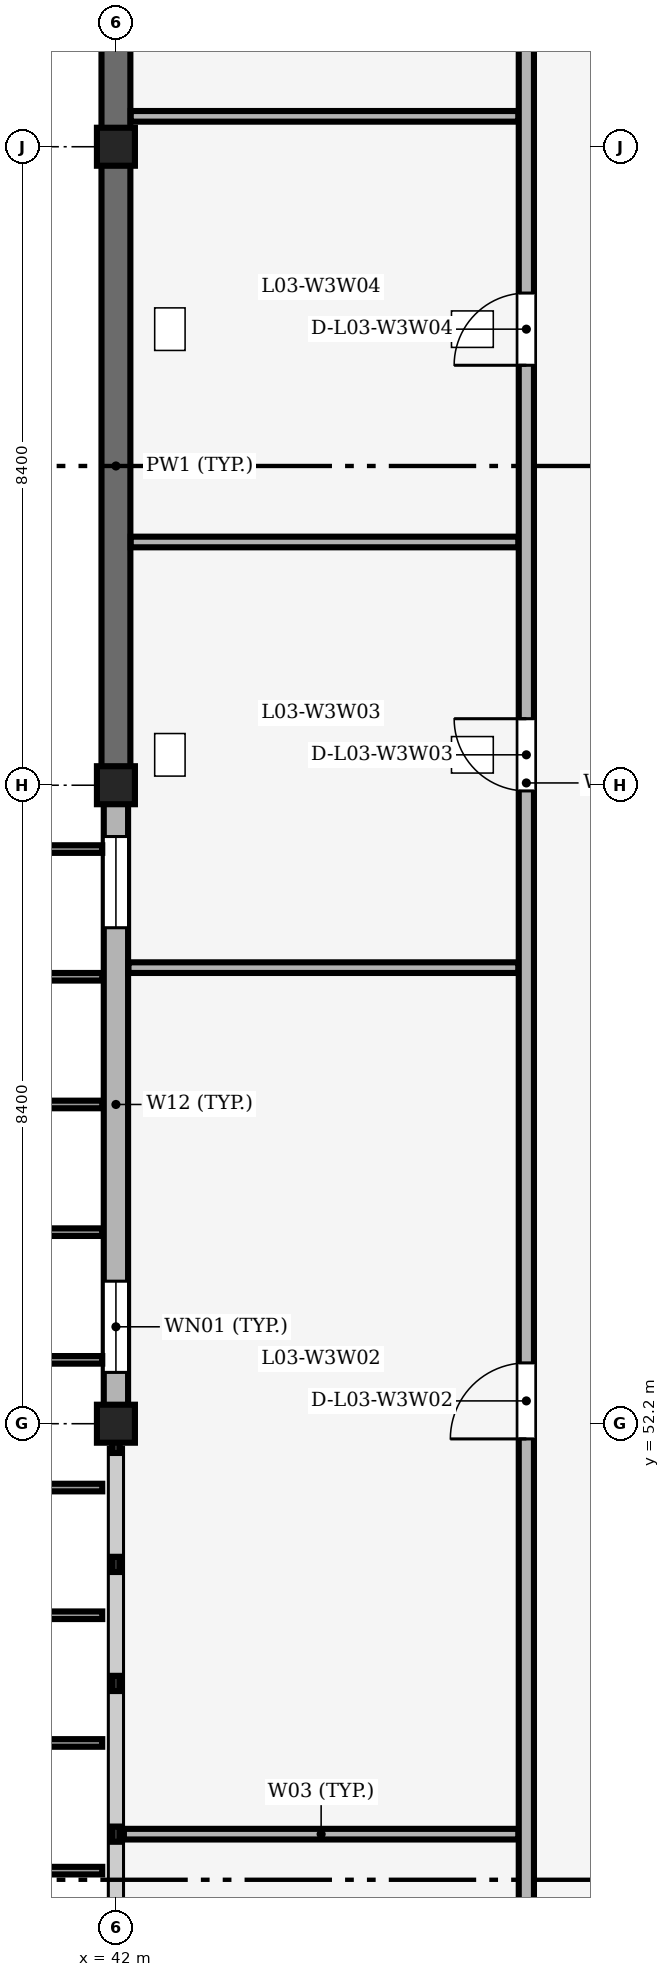
"""IFC4 building model, lengths in metres.
Left out: names, types, materials, properties, quantities, classifications, styles, units other than length and angle.
Written with IfcOpenShell. Run it as: python <this file> out.ifc"""

import sys

from ifc_helpers import new_model, si_unit, direction, frame, frame_2d, origin, origin_2d, place, context, subcontext, project, spatial, rectangle, extrude, element, fill, save


model = new_model("IFC4")
c1 = context("Model", 3, precision=1e-05, world=origin(), true_north=direction((0.0, 1.0)))
c2 = subcontext(c1, "Body", "Model", "MODEL_VIEW")
j1 = project(units=[si_unit("LENGTHUNIT", "METRE"), si_unit("PLANEANGLEUNIT", "RADIAN")], contexts=[c1])
p1 = place(None, origin())
s1 = spatial("IfcSite", under=j1, at=p1, CompositionType="ELEMENT")
p2 = place(p1, origin())
s2 = spatial("IfcBuilding", under=s1, at=p2, CompositionType="ELEMENT")
p3 = place(p2, frame((0.0, 0.0, 13.2)))
s3 = spatial("IfcBuildingStorey", under=s2, at=p3, CompositionType="ELEMENT", Elevation=13.2)
for number, where, z_axis, x_axis in (
    (1, (42.0, 52.2, 0.0), (0.0, 0.0, 1.0), (1.0, 0.0, 0.0)),
    (2, (42.0, 60.6, 0.0), (0.0, 0.0, 1.0), (1.0, 0.0, 0.0)),
    (3, (42.0, 69.0, 0.0), (0.0, 0.0, 1.0), (1.0, 0.0, 0.0)),
):
    element("IfcColumn", number, at=place(p3, frame(where, z_axis=z_axis, x_axis=x_axis)), inside=s3, PredefinedType="COLUMN", context=c2, shape_type="SweptSolid", body=[
        extrude(rectangle(XDim=0.5, YDim=0.5, at=origin_2d()), origin(), (0.0, 0.0, 1.0), 4.2),
    ])
p4 = place(p3, frame((42.0, 52.425, 0.0), z_axis=(0.0, 0.0, 1.0), x_axis=(0.0, 1.0, 0.0)))
e4 = element("IfcWall", 4, at=p4, inside=s3, PredefinedType="SOLIDWALL", context=c2, shape_type="SweptSolid", body=[
    extrude(rectangle(XDim=7.95, YDim=0.32, at=frame_2d((3.975, 0.0))), origin(), (0.0, 0.0, 1.0), 3.16),
])
p5 = place(p4, frame((0.45, 0.0, 0.85)))
e5 = element("IfcOpeningElement", 5, at=p5, cuts=e4, PredefinedType="OPENING", context=c2, shape_type="SweptSolid", body=[
    extrude(rectangle(XDim=1.2, YDim=1.5, at=frame_2d((0.6, 0.75))), frame((0.0, 0.17, 0.0), z_axis=(0.0, -1.0, 0.0), x_axis=(1.0, 0.0, 0.0)), (0.0, 0.0, 1.0), 0.34),
])
p6 = place(p4, frame((6.3, 0.0, 0.85)))
e6 = element("IfcOpeningElement", 6, at=p6, cuts=e4, PredefinedType="OPENING", context=c2, shape_type="SweptSolid", body=[
    extrude(rectangle(XDim=1.2, YDim=1.5, at=frame_2d((0.6, 0.75))), frame((0.0, 0.17, 0.0), z_axis=(0.0, -1.0, 0.0), x_axis=(1.0, 0.0, 0.0)), (0.0, 0.0, 1.0), 0.34),
])
for number, where, z_axis, x_axis in (
    (7, (42.0, 60.825, 0.0), (0.0, 0.0, 1.0), (0.0, 1.0, 0.0)),
    (8, (42.0, 69.225, 0.0), (0.0, 0.0, 1.0), (0.0, 1.0, 0.0)),
):
    element("IfcWall", number, at=place(p3, frame(where, z_axis=z_axis, x_axis=x_axis)), inside=s3, PredefinedType="SHEAR", context=c2, shape_type="SweptSolid", body=[
        extrude(rectangle(XDim=7.95, YDim=0.38, at=frame_2d((3.975, 0.0))), origin(), (0.0, 0.0, 1.0), 3.11),
    ])
p7 = place(p3, frame((42.105, 46.8, 0.0), z_axis=(0.0, 0.0, 1.0), x_axis=(1.0, 0.0, 0.0)))
e9 = element("IfcWall", 9, at=p7, inside=s3, PredefinedType="PARTITIONING", context=c2, shape_type="SweptSolid", body=[
    extrude(rectangle(XDim=5.19, YDim=0.14, at=frame_2d((2.595, 0.0))), origin(), (0.0, 0.0, 1.0), 3.51),
])
p8 = place(p3, frame((42.165, 58.2, 0.0), z_axis=(0.0, 0.0, 1.0), x_axis=(1.0, 0.0, 0.0)))
e10 = element("IfcWall", 10, at=p8, inside=s3, PredefinedType="PARTITIONING", context=c2, shape_type="SweptSolid", body=[
    extrude(rectangle(XDim=5.13, YDim=0.14, at=frame_2d((2.565, 0.0))), origin(), (0.0, 0.0, 1.0), 3.9),
])
p9 = place(p3, frame((42.195, 63.8, 0.0), z_axis=(0.0, 0.0, 1.0), x_axis=(1.0, 0.0, 0.0)))
e11 = element("IfcWall", 11, at=p9, inside=s3, PredefinedType="PARTITIONING", context=c2, shape_type="SweptSolid", body=[
    extrude(rectangle(XDim=5.1, YDim=0.14, at=frame_2d((2.55, 0.0))), origin(), (0.0, 0.0, 1.0), 3.51),
])
p10 = place(p3, frame((42.195, 69.4, 0.0), z_axis=(0.0, 0.0, 1.0), x_axis=(1.0, 0.0, 0.0)))
e12 = element("IfcWall", 12, at=p10, inside=s3, PredefinedType="PARTITIONING", context=c2, shape_type="SweptSolid", body=[
    extrude(rectangle(XDim=5.1, YDim=0.14, at=frame_2d((2.55, 0.0))), origin(), (0.0, 0.0, 1.0), 3.9),
])
p11 = place(p3, frame((47.4, 35.565, 0.0), z_axis=(0.0, 0.0, 1.0), x_axis=(0.0, 1.0, 0.0)))
e13 = element("IfcWall", 13, at=p11, inside=s3, PredefinedType="PARTITIONING", context=c2, shape_type="SweptSolid", body=[
    extrude(rectangle(XDim=50.13, YDim=0.2, at=frame_2d((25.065, 0.0))), origin(), (0.0, 0.0, 1.0), 3.9),
])
p12 = place(p11, frame((5.035, 0.0, 0.0)))
e14 = element("IfcOpeningElement", 14, at=p12, cuts=e13, PredefinedType="OPENING", context=c2, shape_type="SweptSolid", body=[
    extrude(rectangle(XDim=1.0, YDim=2.15, at=frame_2d((0.5, 1.075))), frame((0.0, 0.11, 0.0), z_axis=(0.0, -1.0, 0.0), x_axis=(1.0, 0.0, 0.0)), (0.0, 0.0, 1.0), 0.22),
])
p13 = place(p11, frame((16.435, 0.0, 0.0)))
e15 = element("IfcOpeningElement", 15, at=p13, cuts=e13, PredefinedType="OPENING", context=c2, shape_type="SweptSolid", body=[
    extrude(rectangle(XDim=1.0, YDim=2.15, at=frame_2d((0.5, 1.075))), frame((0.0, 0.11, 0.0), z_axis=(0.0, -1.0, 0.0), x_axis=(1.0, 0.0, 0.0)), (0.0, 0.0, 1.0), 0.22),
])
p14 = place(p11, frame((24.96, 0.0, 0.0)))
e16 = element("IfcOpeningElement", 16, at=p14, cuts=e13, PredefinedType="OPENING", context=c2, shape_type="SweptSolid", body=[
    extrude(rectangle(XDim=0.95, YDim=2.2, at=frame_2d((0.475, 1.1))), frame((0.0, 0.11, 0.0), z_axis=(0.0, -1.0, 0.0), x_axis=(1.0, 0.0, 0.0)), (0.0, 0.0, 1.0), 0.22),
])
p15 = place(p11, frame((30.56, 0.0, 0.0)))
e17 = element("IfcOpeningElement", 17, at=p15, cuts=e13, PredefinedType="OPENING", context=c2, shape_type="SweptSolid", body=[
    extrude(rectangle(XDim=0.95, YDim=2.2, at=frame_2d((0.475, 1.1))), frame((0.0, 0.11, 0.0), z_axis=(0.0, -1.0, 0.0), x_axis=(1.0, 0.0, 0.0)), (0.0, 0.0, 1.0), 0.22),
])
p16 = place(p11, frame((36.16, 0.0, 0.0)))
e18 = element("IfcOpeningElement", 18, at=p16, cuts=e13, PredefinedType="OPENING", context=c2, shape_type="SweptSolid", body=[
    extrude(rectangle(XDim=0.95, YDim=2.1, at=frame_2d((0.475, 1.05))), frame((0.0, 0.11, 0.0), z_axis=(0.0, -1.0, 0.0), x_axis=(1.0, 0.0, 0.0)), (0.0, 0.0, 1.0), 0.22),
])
p17 = place(p11, frame((44.335, 0.0, 0.0)))
e19 = element("IfcOpeningElement", 19, at=p17, cuts=e13, PredefinedType="OPENING", context=c2, shape_type="SweptSolid", body=[
    extrude(rectangle(XDim=1.0, YDim=2.15, at=frame_2d((0.5, 1.075))), frame((0.0, 0.11, 0.0), z_axis=(0.0, -1.0, 0.0), x_axis=(1.0, 0.0, 0.0)), (0.0, 0.0, 1.0), 0.22),
])
p18 = place(p5, origin())
e20 = element("IfcWindow", 20, at=p18, inside=s3, PartitioningType="SINGLE_PANEL", PredefinedType="WINDOW", context=c2, shape_type="SweptSolid", body=[
    extrude(rectangle(XDim=1.2, YDim=1.5, at=frame_2d((0.6, 0.75))), frame((0.0, 0.03, 0.0), z_axis=(0.0, -1.0, 0.0), x_axis=(1.0, 0.0, 0.0)), (0.0, 0.0, 1.0), 0.06),
])
fill(e5, e20)
p19 = place(p6, origin())
e21 = element("IfcWindow", 21, at=p19, inside=s3, PartitioningType="SINGLE_PANEL", PredefinedType="WINDOW", context=c2, shape_type="SweptSolid", body=[
    extrude(rectangle(XDim=1.2, YDim=1.5, at=frame_2d((0.6, 0.75))), frame((0.0, 0.03, 0.0), z_axis=(0.0, -1.0, 0.0), x_axis=(1.0, 0.0, 0.0)), (0.0, 0.0, 1.0), 0.06),
])
fill(e6, e21)
p20 = place(p13, origin())
e22 = element("IfcDoor", 22, at=p20, inside=s3, OperationType="SINGLE_SWING_LEFT", PredefinedType="DOOR", context=c2, shape_type="SweptSolid", body=[
    extrude(rectangle(XDim=1.0, YDim=2.15, at=frame_2d((0.5, 1.075))), frame((0.0, 0.025, 0.0), z_axis=(0.0, -1.0, 0.0), x_axis=(1.0, 0.0, 0.0)), (0.0, 0.0, 1.0), 0.05),
])
fill(e15, e22)
p21 = place(p14, origin())
e23 = element("IfcDoor", 23, at=p21, inside=s3, OperationType="SINGLE_SWING_RIGHT", PredefinedType="DOOR", context=c2, shape_type="SweptSolid", body=[
    extrude(rectangle(XDim=0.95, YDim=2.2, at=frame_2d((0.475, 1.1))), frame((0.0, 0.025, 0.0), z_axis=(0.0, -1.0, 0.0), x_axis=(1.0, 0.0, 0.0)), (0.0, 0.0, 1.0), 0.05),
])
fill(e16, e23)
p22 = place(p15, origin())
e24 = element("IfcDoor", 24, at=p22, inside=s3, OperationType="SINGLE_SWING_LEFT", PredefinedType="DOOR", context=c2, shape_type="SweptSolid", body=[
    extrude(rectangle(XDim=0.95, YDim=2.2, at=frame_2d((0.475, 1.1))), frame((0.0, 0.025, 0.0), z_axis=(0.0, -1.0, 0.0), x_axis=(1.0, 0.0, 0.0)), (0.0, 0.0, 1.0), 0.05),
])
fill(e17, e24)
save(model, sys.argv[1])
